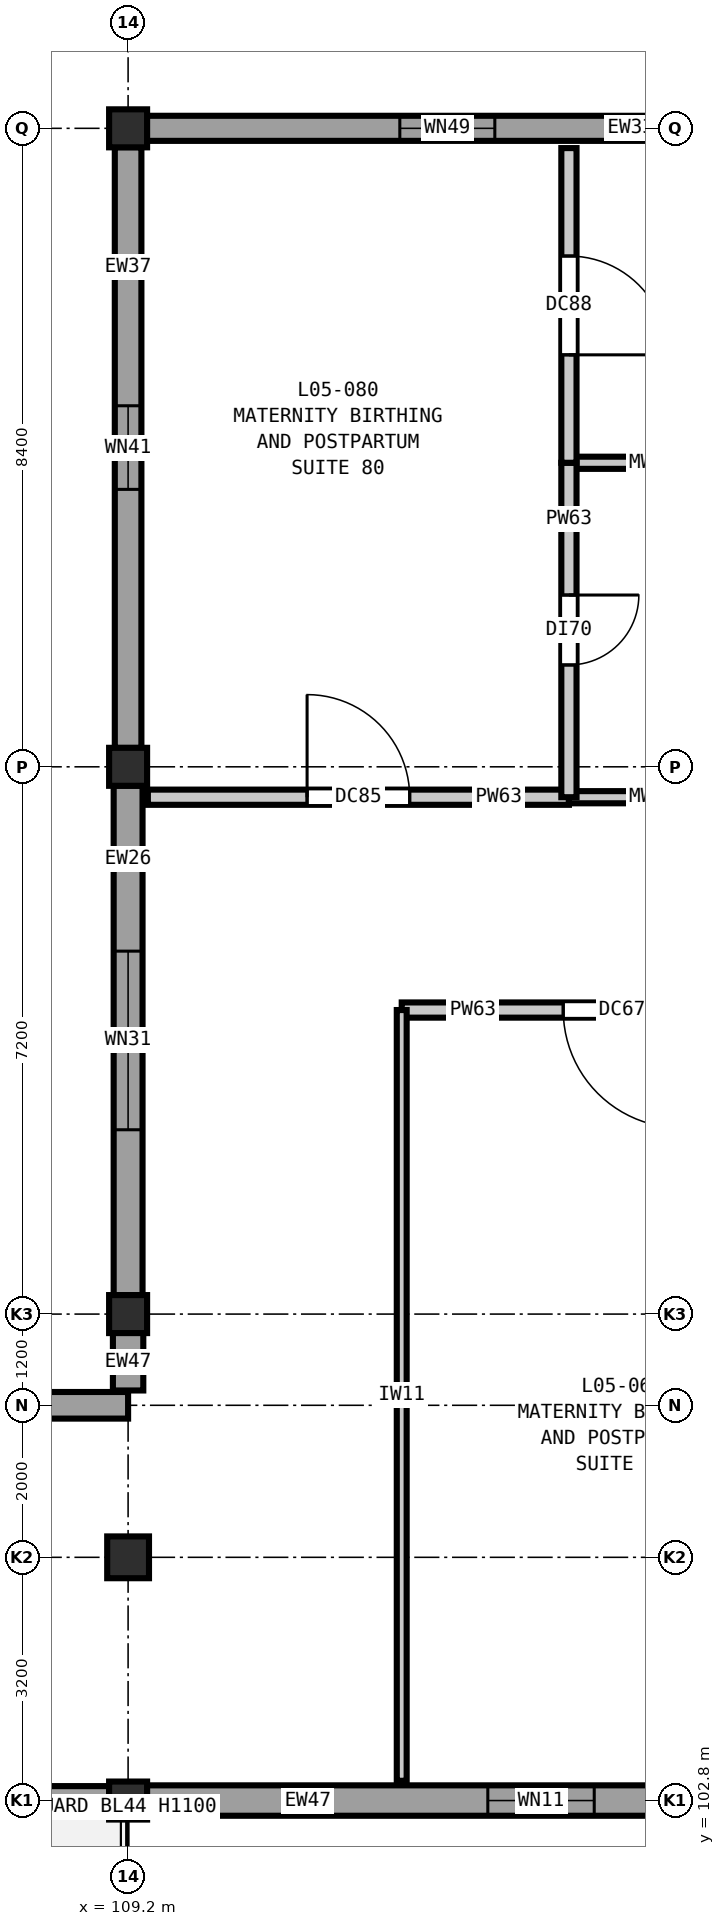
"""IFC4 building model, lengths in metres.
Left out: names, types, materials, properties, quantities, classifications, styles, units other than length and angle.
Written with IfcOpenShell. Run it as: python <this file> out.ifc"""

import sys

from ifc_helpers import new_model, si_unit, direction, frame, frame_2d, origin, origin_2d, place, context, subcontext, project, spatial, rectangle, extrude, element, fill, save


model = new_model("IFC4")
c1 = context("Model", 3, precision=1e-05, world=origin(), true_north=direction((0.0, 1.0)))
c2 = subcontext(c1, "Body", "Model", "MODEL_VIEW")
j1 = project(units=[si_unit("LENGTHUNIT", "METRE"), si_unit("PLANEANGLEUNIT", "RADIAN")], contexts=[c1])
p1 = place(None, origin())
s1 = spatial("IfcSite", under=j1, at=p1, CompositionType="ELEMENT")
p2 = place(p1, origin())
s2 = spatial("IfcBuilding", under=s1, at=p2, CompositionType="ELEMENT")
p3 = place(p2, frame((0.0, 0.0, 24.6)))
s3 = spatial("IfcBuildingStorey", under=s2, at=p3, CompositionType="ELEMENT", Elevation=24.6)
p4 = place(p3, frame((109.2, 102.8, 0.0), z_axis=(0.0, 0.0, 1.0), x_axis=(1.0, 0.0, 0.0)))
e1 = element("IfcColumn", 1, at=p4, inside=s3, PredefinedType="COLUMN", context=c2, shape_type="SweptSolid", body=[
    extrude(rectangle(XDim=0.5, YDim=0.5, at=origin_2d()), origin(), (0.0, 0.0, 1.0), 4.2),
])
p5 = place(p3, frame((109.2, 106.0, 0.0), z_axis=(0.0, 0.0, 1.0), x_axis=(1.0, 0.0, 0.0)))
e2 = element("IfcColumn", 2, at=p5, inside=s3, PredefinedType="COLUMN", context=c2, shape_type="SweptSolid", body=[
    extrude(rectangle(XDim=0.55, YDim=0.55, at=origin_2d()), origin(), (0.0, 0.0, 1.0), 4.2),
])
for number, where, z_axis, x_axis in (
    (3, (109.2, 109.2, 0.0), (0.0, 0.0, 1.0), (1.0, 0.0, 0.0)),
    (4, (109.2, 116.4, 0.0), (0.0, 0.0, 1.0), (1.0, 0.0, 0.0)),
    (5, (109.2, 124.8, 0.0), (0.0, 0.0, 1.0), (1.0, 0.0, 0.0)),
):
    element("IfcColumn", number, at=place(p3, frame(where, z_axis=z_axis, x_axis=x_axis)), inside=s3, PredefinedType="COLUMN", context=c2, shape_type="SweptSolid", body=[
        extrude(rectangle(XDim=0.5, YDim=0.5, at=origin_2d()), origin(), (0.0, 0.0, 1.0), 4.2),
    ])
p6 = place(p3, frame((117.352, 102.8, 0.0), z_axis=(0.0, 0.0, 1.0), x_axis=(-1.0, 0.0, 0.0)))
e6 = element("IfcWall", 6, at=p6, inside=s3, PredefinedType="SOLIDWALL", context=c2, shape_type="SweptSolid", body=[
    extrude(rectangle(XDim=7.904, YDim=0.4, at=frame_2d((3.952, 0.0))), origin(), (0.0, 0.0, 1.0), 3.48),
])
p7 = place(p6, frame((2.019, 0.0, 0.9)))
e7 = element("IfcOpeningElement", 7, at=p7, cuts=e6, PredefinedType="OPENING", context=c2, shape_type="SweptSolid", body=[
    extrude(rectangle(XDim=1.4, YDim=2.15, at=frame_2d((0.7, 1.075))), frame((0.0, 0.21, 0.0), z_axis=(0.0, -1.0, 0.0), x_axis=(1.0, 0.0, 0.0)), (0.0, 0.0, 1.0), 0.42),
])
p8 = place(p3, frame((108.952, 102.8, 0.0), z_axis=(0.0, 0.0, 1.0), x_axis=(-1.0, 0.0, 0.0)))
e8 = element("IfcWall", 8, at=p8, inside=s3, PredefinedType="SOLIDWALL", context=c2, shape_type="SweptSolid", body=[
    extrude(rectangle(XDim=7.904, YDim=0.38, at=frame_2d((3.952, 0.0))), origin(), (0.0, 0.0, 1.0), 3.48),
])
p9 = place(p8, frame((3.202, 0.0, 0.0)))
e9 = element("IfcOpeningElement", 9, at=p9, cuts=e8, PredefinedType="OPENING", context=c2, shape_type="SweptSolid", body=[
    extrude(rectangle(XDim=1.5, YDim=2.2, at=frame_2d((0.75, 1.1))), frame((0.0, 0.2, 0.0), z_axis=(0.0, -1.0, 0.0), x_axis=(1.0, 0.0, 0.0)), (0.0, 0.0, 1.0), 0.4),
])
p10 = place(p3, frame((101.048, 108.0, 0.0), z_axis=(0.0, 0.0, 1.0), x_axis=(1.0, 0.0, 0.0)))
e10 = element("IfcWall", 10, at=p10, inside=s3, PredefinedType="SOLIDWALL", context=c2, shape_type="SweptSolid", body=[
    extrude(rectangle(XDim=8.152, YDim=0.35, at=frame_2d((4.076, 0.0))), origin(), (0.0, 0.0, 1.0), 3.48),
])
p11 = place(p10, frame((3.001, 0.0, 0.9)))
e11 = element("IfcOpeningElement", 11, at=p11, cuts=e10, PredefinedType="OPENING", context=c2, shape_type="SweptSolid", body=[
    extrude(rectangle(XDim=2.15, YDim=1.75, at=frame_2d((1.075, 0.875))), frame((0.0, 0.185, 0.0), z_axis=(0.0, -1.0, 0.0), x_axis=(1.0, 0.0, 0.0)), (0.0, 0.0, 1.0), 0.37),
])
p12 = place(p3, frame((109.2, 108.195, 0.0), z_axis=(0.0, 0.0, 1.0), x_axis=(0.0, 1.0, 0.0)))
e12 = element("IfcWall", 12, at=p12, inside=s3, PredefinedType="SOLIDWALL", context=c2, shape_type="SweptSolid", body=[
    extrude(rectangle(XDim=0.757, YDim=0.4, at=frame_2d((0.378, 0.0))), origin(), (0.0, 0.0, 1.0), 3.48),
])
p13 = place(p3, frame((109.2, 109.448, 0.0), z_axis=(0.0, 0.0, 1.0), x_axis=(0.0, 1.0, 0.0)))
e13 = element("IfcWall", 13, at=p13, inside=s3, PredefinedType="SOLIDWALL", context=c2, shape_type="SweptSolid", body=[
    extrude(rectangle(XDim=6.704, YDim=0.38, at=frame_2d((3.352, 0.0))), origin(), (0.0, 0.0, 1.0), 3.48),
])
p14 = place(p13, frame((2.177, 0.0, 0.9)))
e14 = element("IfcOpeningElement", 14, at=p14, cuts=e13, PredefinedType="OPENING", context=c2, shape_type="SweptSolid", body=[
    extrude(rectangle(XDim=2.35, YDim=1.75, at=frame_2d((1.175, 0.875))), frame((0.0, 0.2, 0.0), z_axis=(0.0, -1.0, 0.0), x_axis=(1.0, 0.0, 0.0)), (0.0, 0.0, 1.0), 0.4),
])
p15 = place(p3, frame((109.2, 116.648, 0.0), z_axis=(0.0, 0.0, 1.0), x_axis=(0.0, 1.0, 0.0)))
e15 = element("IfcWall", 15, at=p15, inside=s3, PredefinedType="SOLIDWALL", context=c2, shape_type="SweptSolid", body=[
    extrude(rectangle(XDim=7.904, YDim=0.35, at=frame_2d((3.952, 0.0))), origin(), (0.0, 0.0, 1.0), 3.48),
])
p16 = place(p15, frame((3.402, 0.0, 0.9)))
e16 = element("IfcOpeningElement", 16, at=p16, cuts=e15, PredefinedType="OPENING", context=c2, shape_type="SweptSolid", body=[
    extrude(rectangle(XDim=1.1, YDim=1.95, at=frame_2d((0.55, 0.975))), frame((0.0, 0.185, 0.0), z_axis=(0.0, -1.0, 0.0), x_axis=(1.0, 0.0, 0.0)), (0.0, 0.0, 1.0), 0.37),
])
p17 = place(p3, frame((109.448, 124.8, 0.0), z_axis=(0.0, 0.0, 1.0), x_axis=(1.0, 0.0, 0.0)))
e17 = element("IfcWall", 17, at=p17, inside=s3, PredefinedType="SOLIDWALL", context=c2, shape_type="SweptSolid", body=[
    extrude(rectangle(XDim=7.904, YDim=0.33, at=frame_2d((3.952, 0.0))), origin(), (0.0, 0.0, 1.0), 3.48),
])
p18 = place(p17, frame((3.327, 0.0, 0.9)))
e18 = element("IfcOpeningElement", 18, at=p18, cuts=e17, PredefinedType="OPENING", context=c2, shape_type="SweptSolid", body=[
    extrude(rectangle(XDim=1.25, YDim=1.95, at=frame_2d((0.625, 0.975))), frame((0.0, 0.175, 0.0), z_axis=(0.0, -1.0, 0.0), x_axis=(1.0, 0.0, 0.0)), (0.0, 0.0, 1.0), 0.35),
])
p19 = place(p3, frame((112.8, 113.2, 0.0), z_axis=(0.0, 0.0, 1.0), x_axis=(1.0, 0.0, 0.0)))
e19 = element("IfcWall", 19, at=p19, inside=s3, PredefinedType="PARTITIONING", context=c2, shape_type="SweptSolid", body=[
    extrude(rectangle(XDim=5.8, YDim=0.2, at=frame_2d((2.9, 0.0))), origin(), (0.0, 0.0, 1.0), 3.92),
])
p20 = place(p19, frame((2.125, 0.0, 0.0)))
e20 = element("IfcOpeningElement", 20, at=p20, cuts=e19, PredefinedType="OPENING", context=c2, shape_type="SweptSolid", body=[
    extrude(rectangle(XDim=1.55, YDim=2.25, at=frame_2d((0.775, 1.125))), frame((0.0, 0.11, 0.0), z_axis=(0.0, -1.0, 0.0), x_axis=(1.0, 0.0, 0.0)), (0.0, 0.0, 1.0), 0.22),
])
p21 = place(p3, frame((109.46, 116.0, 0.0), z_axis=(0.0, 0.0, 1.0), x_axis=(1.0, 0.0, 0.0)))
e21 = element("IfcWall", 21, at=p21, inside=s3, PredefinedType="PARTITIONING", context=c2, shape_type="SweptSolid", body=[
    extrude(rectangle(XDim=5.54, YDim=0.2, at=frame_2d((2.77, 0.0))), origin(), (0.0, 0.0, 1.0), 3.92),
])
p22 = place(p21, frame((2.095, 0.0, 0.0)))
e22 = element("IfcOpeningElement", 22, at=p22, cuts=e21, PredefinedType="OPENING", context=c2, shape_type="SweptSolid", body=[
    extrude(rectangle(XDim=1.35, YDim=2.2, at=frame_2d((0.675, 1.1))), frame((0.0, 0.11, 0.0), z_axis=(0.0, -1.0, 0.0), x_axis=(1.0, 0.0, 0.0)), (0.0, 0.0, 1.0), 0.22),
])
for number, where, z_axis, x_axis in (
    (23, (115.0, 116.0, 0.0), (0.0, 0.0, 1.0), (1.0, 0.0, 0.0)),
    (24, (115.0, 120.4, 0.0), (0.0, 0.0, 1.0), (1.0, 0.0, 0.0)),
):
    element("IfcWall", number, at=place(p3, frame(where, z_axis=z_axis, x_axis=x_axis)), inside=s3, PredefinedType="PLUMBINGWALL", context=c2, shape_type="SweptSolid", body=[
        extrude(rectangle(XDim=2.2, YDim=0.16, at=frame_2d((1.1, 0.0))), origin(), (0.0, 0.0, 1.0), 3.92),
    ])
p23 = place(p3, frame((112.8, 103.06, 0.0), z_axis=(0.0, 0.0, 1.0), x_axis=(0.0, 1.0, 0.0)))
e25 = element("IfcWall", 25, at=p23, inside=s3, PredefinedType="PARTITIONING", context=c2, shape_type="SweptSolid", body=[
    extrude(rectangle(XDim=10.14, YDim=0.13, at=frame_2d((5.07, 0.0))), origin(), (0.0, 0.0, 1.0), 3.92),
])
p24 = place(p3, frame((115.0, 116.0, 0.0), z_axis=(0.0, 0.0, 1.0), x_axis=(0.0, 1.0, 0.0)))
e26 = element("IfcWall", 26, at=p24, inside=s3, PredefinedType="PARTITIONING", context=c2, shape_type="SweptSolid", body=[
    extrude(rectangle(XDim=4.4, YDim=0.2, at=frame_2d((2.2, 0.0))), origin(), (0.0, 0.0, 1.0), 3.92),
])
p25 = place(p24, frame((1.74, 0.0, 0.0)))
e27 = element("IfcOpeningElement", 27, at=p25, cuts=e26, PredefinedType="OPENING", context=c2, shape_type="SweptSolid", body=[
    extrude(rectangle(XDim=0.92, YDim=2.1, at=frame_2d((0.46, 1.05))), frame((0.0, 0.11, 0.0), z_axis=(0.0, -1.0, 0.0), x_axis=(1.0, 0.0, 0.0)), (0.0, 0.0, 1.0), 0.22),
])
p26 = place(p3, frame((115.0, 120.4, 0.0), z_axis=(0.0, 0.0, 1.0), x_axis=(0.0, 1.0, 0.0)))
e28 = element("IfcWall", 28, at=p26, inside=s3, PredefinedType="PARTITIONING", context=c2, shape_type="SweptSolid", body=[
    extrude(rectangle(XDim=4.14, YDim=0.2, at=frame_2d((2.07, 0.0))), origin(), (0.0, 0.0, 1.0), 3.92),
])
p27 = place(p26, frame((1.42, 0.0, 0.0)))
e29 = element("IfcOpeningElement", 29, at=p27, cuts=e28, PredefinedType="OPENING", context=c2, shape_type="SweptSolid", body=[
    extrude(rectangle(XDim=1.3, YDim=2.2, at=frame_2d((0.65, 1.1))), frame((0.0, 0.11, 0.0), z_axis=(0.0, -1.0, 0.0), x_axis=(1.0, 0.0, 0.0)), (0.0, 0.0, 1.0), 0.22),
])
p28 = place(p7, origin())
e30 = element("IfcWindow", 30, at=p28, inside=s3, PartitioningType="SINGLE_PANEL", PredefinedType="WINDOW", context=c2, shape_type="SweptSolid", body=[
    extrude(rectangle(XDim=1.4, YDim=2.15, at=frame_2d((0.7, 1.075))), frame((0.0, 0.03, 0.0), z_axis=(0.0, -1.0, 0.0), x_axis=(1.0, 0.0, 0.0)), (0.0, 0.0, 1.0), 0.06),
])
fill(e7, e30)
p29 = place(p14, origin())
e31 = element("IfcWindow", 31, at=p29, inside=s3, PartitioningType="DOUBLE_PANEL_VERTICAL", PredefinedType="WINDOW", context=c2, shape_type="SweptSolid", body=[
    extrude(rectangle(XDim=2.35, YDim=1.75, at=frame_2d((1.175, 0.875))), frame((0.0, 0.03, 0.0), z_axis=(0.0, -1.0, 0.0), x_axis=(1.0, 0.0, 0.0)), (0.0, 0.0, 1.0), 0.06),
])
fill(e14, e31)
p30 = place(p16, origin())
e32 = element("IfcWindow", 32, at=p30, inside=s3, PartitioningType="SINGLE_PANEL", PredefinedType="WINDOW", context=c2, shape_type="SweptSolid", body=[
    extrude(rectangle(XDim=1.1, YDim=1.95, at=frame_2d((0.55, 0.975))), frame((0.0, 0.03, 0.0), z_axis=(0.0, -1.0, 0.0), x_axis=(1.0, 0.0, 0.0)), (0.0, 0.0, 1.0), 0.06),
])
fill(e16, e32)
p31 = place(p18, origin())
e33 = element("IfcWindow", 33, at=p31, inside=s3, PartitioningType="SINGLE_PANEL", PredefinedType="WINDOW", context=c2, shape_type="SweptSolid", body=[
    extrude(rectangle(XDim=1.25, YDim=1.95, at=frame_2d((0.625, 0.975))), frame((0.0, 0.03, 0.0), z_axis=(0.0, -1.0, 0.0), x_axis=(1.0, 0.0, 0.0)), (0.0, 0.0, 1.0), 0.06),
])
fill(e18, e33)
p32 = place(p20, frame((1.55, 0.0, 0.0), z_axis=(0.0, 0.0, 1.0), x_axis=(-1.0, 0.0, 0.0)))
e34 = element("IfcDoor", 34, at=p32, inside=s3, OperationType="SINGLE_SWING_LEFT", PredefinedType="DOOR", context=c2, shape_type="SweptSolid", body=[
    extrude(rectangle(XDim=1.55, YDim=2.25, at=frame_2d((0.775, 1.125))), frame((0.0, 0.025, 0.0), z_axis=(0.0, -1.0, 0.0), x_axis=(1.0, 0.0, 0.0)), (0.0, 0.0, 1.0), 0.05),
])
fill(e20, e34)
p33 = place(p22, origin())
e35 = element("IfcDoor", 35, at=p33, inside=s3, OperationType="SINGLE_SWING_LEFT", PredefinedType="DOOR", context=c2, shape_type="SweptSolid", body=[
    extrude(rectangle(XDim=1.35, YDim=2.2, at=frame_2d((0.675, 1.1))), frame((0.0, 0.025, 0.0), z_axis=(0.0, -1.0, 0.0), x_axis=(1.0, 0.0, 0.0)), (0.0, 0.0, 1.0), 0.05),
])
fill(e22, e35)
p34 = place(p25, frame((0.92, 0.0, 0.0), z_axis=(0.0, 0.0, 1.0), x_axis=(-1.0, 0.0, 0.0)))
e36 = element("IfcDoor", 36, at=p34, inside=s3, OperationType="SINGLE_SWING_LEFT", PredefinedType="DOOR", context=c2, shape_type="SweptSolid", body=[
    extrude(rectangle(XDim=0.92, YDim=2.1, at=frame_2d((0.46, 1.05))), frame((0.0, 0.025, 0.0), z_axis=(0.0, -1.0, 0.0), x_axis=(1.0, 0.0, 0.0)), (0.0, 0.0, 1.0), 0.05),
])
fill(e27, e36)
p35 = place(p27, frame((1.3, 0.0, 0.0), z_axis=(0.0, 0.0, 1.0), x_axis=(-1.0, 0.0, 0.0)))
e37 = element("IfcDoor", 37, at=p35, inside=s3, OperationType="SINGLE_SWING_RIGHT", PredefinedType="DOOR", context=c2, shape_type="SweptSolid", body=[
    extrude(rectangle(XDim=1.3, YDim=2.2, at=frame_2d((0.65, 1.1))), frame((0.0, 0.025, 0.0), z_axis=(0.0, -1.0, 0.0), x_axis=(1.0, 0.0, 0.0)), (0.0, 0.0, 1.0), 0.05),
])
fill(e29, e37)
save(model, sys.argv[1])
